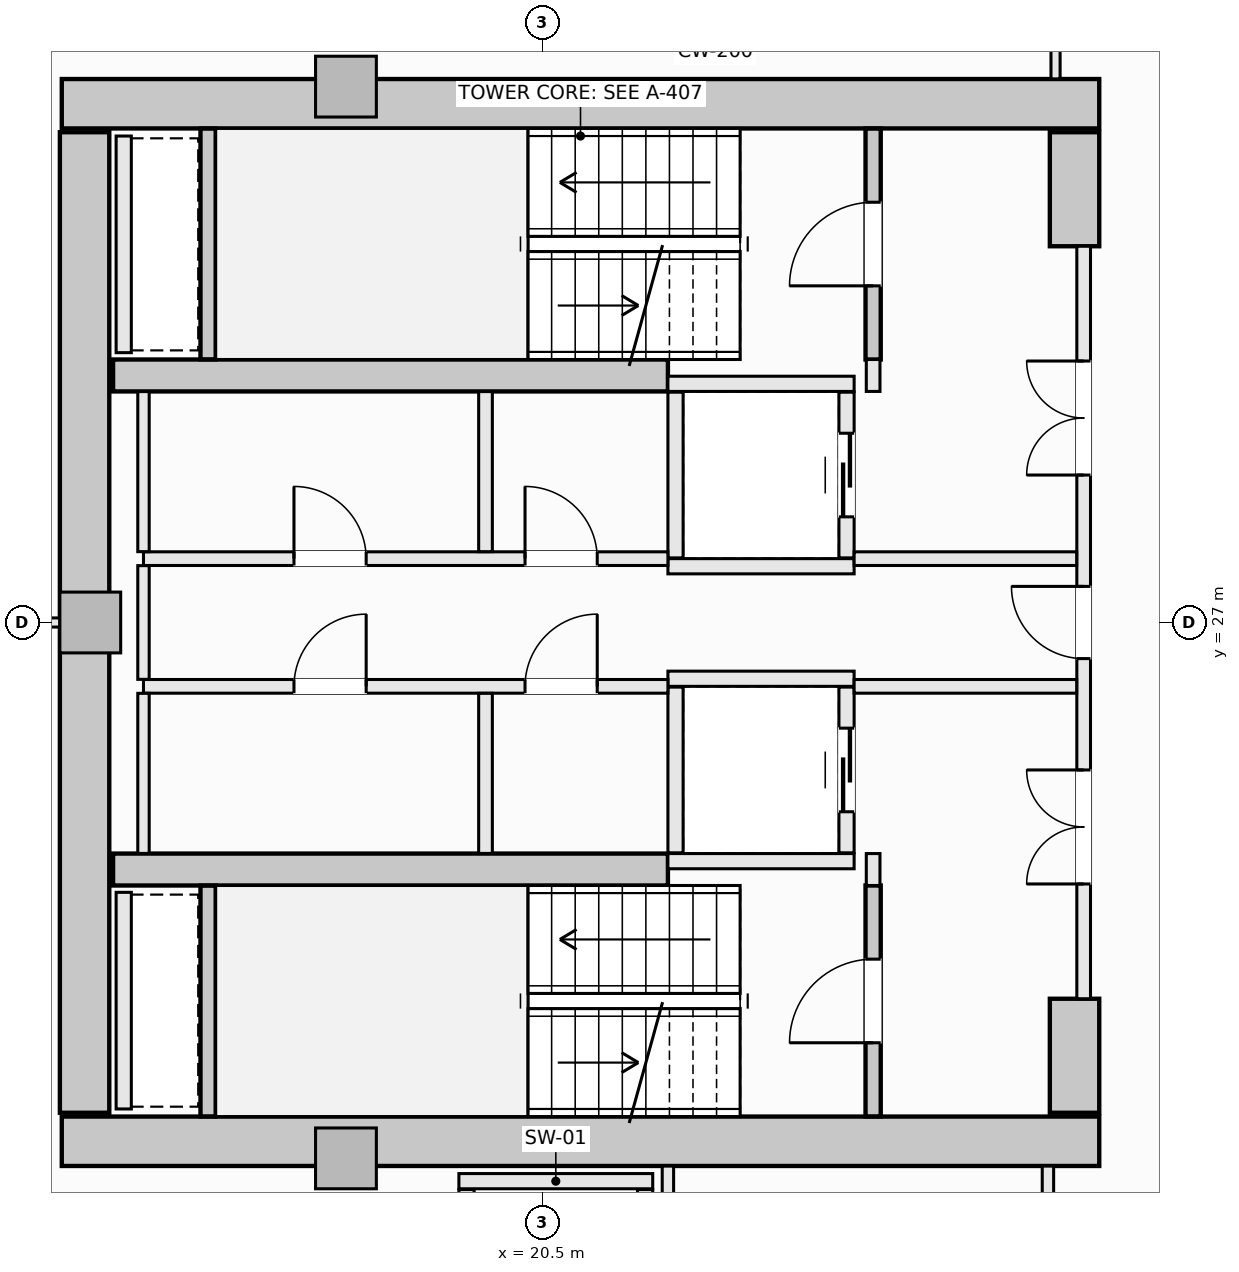
"""IFC4 building model, lengths in metres.
Left out: names, types, materials, properties, quantities, classifications, styles, units other than length and angle.
Written with IfcOpenShell. Run it as: python <this file> out.ifc"""

import sys

from ifc_helpers import new_model, si_unit, direction, frame, frame_2d, origin, origin_2d, place, context, subcontext, project, spatial, rectangle, extrude, element, fill, save


model = new_model("IFC4")
c1 = context("Model", 3, precision=1e-05, world=origin(), true_north=direction((0.0, 1.0)))
c2 = subcontext(c1, "Body", "Model", "MODEL_VIEW")
j1 = project(units=[si_unit("LENGTHUNIT", "METRE"), si_unit("PLANEANGLEUNIT", "RADIAN")], contexts=[c1])
p1 = place(None, origin())
s1 = spatial("IfcSite", under=j1, at=p1, CompositionType="ELEMENT")
p2 = place(p1, origin())
s2 = spatial("IfcBuilding", under=s1, at=p2, CompositionType="ELEMENT")
p3 = place(p2, frame((0.0, 0.0, 166.5)))
s3 = spatial("IfcBuildingStorey", under=s2, at=p3, CompositionType="ELEMENT", Elevation=166.5)
for number, where, z_axis, x_axis in (
    (1, (14.175, 33.825, -0.27), (0.0, 0.0, 1.0), (1.0, 0.0, 0.0)),
    (2, (14.175, 20.175, -0.27), (0.0, 0.0, 1.0), (1.0, 0.0, 0.0)),
):
    element("IfcWall", number, at=place(p3, frame(where, z_axis=z_axis, x_axis=x_axis)), inside=s3, PredefinedType="SHEAR", context=c2, shape_type="SweptSolid", body=[
        extrude(rectangle(XDim=13.65, YDim=0.65, at=frame_2d((6.825, 0.0))), origin(), (0.0, 0.0, 1.0), 3.4),
    ])
p4 = place(p3, frame((14.475, 20.55, -0.27), z_axis=(0.0, 0.0, 1.0), x_axis=(0.0, 1.0, 0.0)))
e3 = element("IfcWall", 3, at=p4, inside=s3, PredefinedType="SHEAR", context=c2, shape_type="SweptSolid", body=[
    extrude(rectangle(XDim=12.9, YDim=0.65, at=frame_2d((6.45, 0.0))), origin(), (0.0, 0.0, 1.0), 3.4),
])
for number, where, z_axis, x_axis in (
    (4, (27.5, 31.95, -0.27), (0.0, 0.0, 1.0), (0.0, 1.0, 0.0)),
    (5, (27.5, 20.55, -0.27), (0.0, 0.0, 1.0), (0.0, 1.0, 0.0)),
):
    element("IfcWall", number, at=place(p3, frame(where, z_axis=z_axis, x_axis=x_axis)), inside=s3, PredefinedType="SHEAR", context=c2, shape_type="SweptSolid", body=[
        extrude(rectangle(XDim=1.5, YDim=0.65, at=frame_2d((0.75, 0.0))), origin(), (0.0, 0.0, 1.0), 3.4),
    ])
for number, where, z_axis, x_axis in (
    (6, (14.85, 30.25, -0.27), (0.0, 0.0, 1.0), (1.0, 0.0, 0.0)),
    (7, (14.85, 23.75, -0.27), (0.0, 0.0, 1.0), (1.0, 0.0, 0.0)),
):
    element("IfcWall", number, at=place(p3, frame(where, z_axis=z_axis, x_axis=x_axis)), inside=s3, PredefinedType="SHEAR", context=c2, shape_type="SweptSolid", body=[
        extrude(rectangle(XDim=7.3, YDim=0.42, at=frame_2d((3.65, 0.0))), origin(), (0.0, 0.0, 1.0), 3.4),
    ])
for number, where, z_axis, x_axis in (
    (8, (17.914, 34.05, -0.27), (0.0, 0.0, 1.0), (1.0, 0.0, 0.0)),
    (9, (14.55, 27.0, -0.27), (0.0, 0.0, 1.0), (1.0, 0.0, 0.0)),
    (10, (17.914, 19.95, -0.27), (0.0, 0.0, 1.0), (1.0, 0.0, 0.0)),
):
    element("IfcColumn", number, at=place(p3, frame(where, z_axis=z_axis, x_axis=x_axis)), inside=s3, PredefinedType="PILASTER", context=c2, shape_type="SweptSolid", body=[
        extrude(rectangle(XDim=0.8, YDim=0.8, at=origin_2d()), origin(), (0.0, 0.0, 1.0), 3.4),
    ])
p5 = place(p3, frame((24.85, 30.46, -0.27), z_axis=(0.0, 0.0, 1.0), x_axis=(0.0, 1.0, 0.0)))
e11 = element("IfcWall", 11, at=p5, inside=s3, PredefinedType="SHEAR", context=c2, shape_type="SweptSolid", body=[
    extrude(rectangle(XDim=3.038, YDim=0.2, at=frame_2d((1.519, 0.0))), origin(), (0.0, 0.0, 1.0), 3.4),
])
p6 = place(p5, frame((0.969, 0.0, 0.27)))
e12 = element("IfcOpeningElement", 12, at=p6, cuts=e11, PredefinedType="OPENING", context=c2, shape_type="SweptSolid", body=[
    extrude(rectangle(XDim=1.1, YDim=2.15, at=frame_2d((0.55, 1.075))), frame((0.0, 0.11, 0.0), z_axis=(0.0, -1.0, 0.0), x_axis=(1.0, 0.0, 0.0)), (0.0, 0.0, 1.0), 0.22),
])
p7 = place(p3, frame((16.1, 30.462, -0.27), z_axis=(0.0, 0.0, 1.0), x_axis=(0.0, 1.0, 0.0)))
e13 = element("IfcWall", 13, at=p7, inside=s3, PredefinedType="SHEAR", context=c2, shape_type="SweptSolid", body=[
    extrude(rectangle(XDim=3.036, YDim=0.2, at=frame_2d((1.518, 0.0))), origin(), (0.0, 0.0, 1.0), 3.4),
])
p8 = place(p3, frame((24.85, 20.502, -0.27), z_axis=(0.0, 0.0, 1.0), x_axis=(0.0, 1.0, 0.0)))
e14 = element("IfcWall", 14, at=p8, inside=s3, PredefinedType="SHEAR", context=c2, shape_type="SweptSolid", body=[
    extrude(rectangle(XDim=3.038, YDim=0.2, at=frame_2d((1.519, 0.0))), origin(), (0.0, 0.0, 1.0), 3.4),
])
p9 = place(p8, frame((0.969, 0.0, 0.27)))
e15 = element("IfcOpeningElement", 15, at=p9, cuts=e14, PredefinedType="OPENING", context=c2, shape_type="SweptSolid", body=[
    extrude(rectangle(XDim=1.1, YDim=2.15, at=frame_2d((0.55, 1.075))), frame((0.0, 0.11, 0.0), z_axis=(0.0, -1.0, 0.0), x_axis=(1.0, 0.0, 0.0)), (0.0, 0.0, 1.0), 0.22),
])
p10 = place(p3, frame((16.1, 20.502, -0.27), z_axis=(0.0, 0.0, 1.0), x_axis=(0.0, 1.0, 0.0)))
e16 = element("IfcWall", 16, at=p10, inside=s3, PredefinedType="SHEAR", context=c2, shape_type="SweptSolid", body=[
    extrude(rectangle(XDim=3.036, YDim=0.2, at=frame_2d((1.518, 0.0))), origin(), (0.0, 0.0, 1.0), 3.4),
])
for number, where, z_axis, x_axis in (
    (17, (22.15, 30.14, 0.0), (0.0, 0.0, 1.0), (1.0, 0.0, 0.0)),
    (18, (22.15, 27.74, 0.0), (0.0, 0.0, 1.0), (1.0, 0.0, 0.0)),
):
    element("IfcWall", number, at=place(p3, frame(where, z_axis=z_axis, x_axis=x_axis)), inside=s3, PredefinedType="SOLIDWALL", context=c2, shape_type="SweptSolid", body=[
        extrude(rectangle(XDim=2.45, YDim=0.2, at=frame_2d((1.225, 0.0))), origin(), (0.0, 0.0, 1.0), 3.13),
    ])
p11 = place(p3, frame((22.25, 27.85, 0.0), z_axis=(0.0, 0.0, 1.0), x_axis=(0.0, 1.0, 0.0)))
e19 = element("IfcWall", 19, at=p11, inside=s3, PredefinedType="SOLIDWALL", context=c2, shape_type="SweptSolid", body=[
    extrude(rectangle(XDim=2.18, YDim=0.2, at=frame_2d((1.09, 0.0))), origin(), (0.0, 0.0, 1.0), 3.13),
])
p12 = place(p3, frame((24.5, 27.85, 0.0), z_axis=(0.0, 0.0, 1.0), x_axis=(0.0, 1.0, 0.0)))
e20 = element("IfcWall", 20, at=p12, inside=s3, PredefinedType="SOLIDWALL", context=c2, shape_type="SweptSolid", body=[
    extrude(rectangle(XDim=2.18, YDim=0.2, at=frame_2d((1.09, 0.0))), origin(), (0.0, 0.0, 1.0), 3.13),
])
p13 = place(p12, frame((0.54, 0.0, 0.0)))
e21 = element("IfcOpeningElement", 21, at=p13, cuts=e20, PredefinedType="OPENING", context=c2, shape_type="SweptSolid", body=[
    extrude(rectangle(XDim=1.1, YDim=2.2, at=frame_2d((0.55, 1.1))), frame((0.0, 0.11, 0.0), z_axis=(0.0, -1.0, 0.0), x_axis=(1.0, 0.0, 0.0)), (0.0, 0.0, 1.0), 0.22),
])
for number, where, z_axis, x_axis in (
    (22, (22.15, 26.26, 0.0), (0.0, 0.0, 1.0), (1.0, 0.0, 0.0)),
    (23, (22.15, 23.86, 0.0), (0.0, 0.0, 1.0), (1.0, 0.0, 0.0)),
):
    element("IfcWall", number, at=place(p3, frame(where, z_axis=z_axis, x_axis=x_axis)), inside=s3, PredefinedType="SOLIDWALL", context=c2, shape_type="SweptSolid", body=[
        extrude(rectangle(XDim=2.45, YDim=0.2, at=frame_2d((1.225, 0.0))), origin(), (0.0, 0.0, 1.0), 3.13),
    ])
p14 = place(p3, frame((22.25, 23.97, 0.0), z_axis=(0.0, 0.0, 1.0), x_axis=(0.0, 1.0, 0.0)))
e24 = element("IfcWall", 24, at=p14, inside=s3, PredefinedType="SOLIDWALL", context=c2, shape_type="SweptSolid", body=[
    extrude(rectangle(XDim=2.18, YDim=0.2, at=frame_2d((1.09, 0.0))), origin(), (0.0, 0.0, 1.0), 3.13),
])
p15 = place(p3, frame((24.5, 23.97, 0.0), z_axis=(0.0, 0.0, 1.0), x_axis=(0.0, 1.0, 0.0)))
e25 = element("IfcWall", 25, at=p15, inside=s3, PredefinedType="SOLIDWALL", context=c2, shape_type="SweptSolid", body=[
    extrude(rectangle(XDim=2.18, YDim=0.2, at=frame_2d((1.09, 0.0))), origin(), (0.0, 0.0, 1.0), 3.13),
])
p16 = place(p15, frame((0.54, 0.0, 0.0)))
e26 = element("IfcOpeningElement", 26, at=p16, cuts=e25, PredefinedType="OPENING", context=c2, shape_type="SweptSolid", body=[
    extrude(rectangle(XDim=1.1, YDim=2.2, at=frame_2d((0.55, 1.1))), frame((0.0, 0.11, 0.0), z_axis=(0.0, -1.0, 0.0), x_axis=(1.0, 0.0, 0.0)), (0.0, 0.0, 1.0), 0.22),
])
p17 = place(p3, frame((19.4, 19.65, 0.0), z_axis=(0.0, 0.0, 1.0), x_axis=(1.0, 0.0, 0.0)))
e27 = element("IfcWall", 27, at=p17, inside=s3, PredefinedType="SOLIDWALL", context=c2, shape_type="SweptSolid", body=[
    extrude(rectangle(XDim=2.55, YDim=0.2, at=frame_2d((1.275, 0.0))), origin(), (0.0, 0.0, 1.0), 3.13),
])
for number, where, z_axis, x_axis in (
    (28, (19.5, 17.01, 0.0), (0.0, 0.0, 1.0), (0.0, 1.0, 0.0)),
    (29, (21.85, 17.01, 0.0), (0.0, 0.0, 1.0), (0.0, 1.0, 0.0)),
):
    element("IfcWall", number, at=place(p3, frame(where, z_axis=z_axis, x_axis=x_axis)), inside=s3, PredefinedType="SOLIDWALL", context=c2, shape_type="SweptSolid", body=[
        extrude(rectangle(XDim=2.53, YDim=0.2, at=frame_2d((1.265, 0.0))), origin(), (0.0, 0.0, 1.0), 3.13),
    ])
for number, where, z_axis, x_axis in (
    (30, (14.99, 30.55, 0.0), (0.0, 0.0, 1.0), (0.0, 1.0, 0.0)),
    (31, (14.99, 20.6, 0.0), (0.0, 0.0, 1.0), (0.0, 1.0, 0.0)),
):
    element("IfcWall", number, at=place(p3, frame(where, z_axis=z_axis, x_axis=x_axis)), inside=s3, PredefinedType="SOLIDWALL", context=c2, shape_type="SweptSolid", body=[
        extrude(rectangle(XDim=2.85, YDim=0.2, at=frame_2d((1.425, 0.0))), origin(), (0.0, 0.0, 1.0), 3.13),
    ])
for number, where, z_axis, x_axis in (
    (32, (24.85, 23.54, 0.0), (0.0, 0.0, 1.0), (0.0, 1.0, 0.0)),
    (33, (24.85, 30.04, 0.0), (0.0, 0.0, 1.0), (0.0, 1.0, 0.0)),
):
    element("IfcWall", number, at=place(p3, frame(where, z_axis=z_axis, x_axis=x_axis)), inside=s3, PredefinedType="SOLIDWALL", context=c2, shape_type="SweptSolid", body=[
        extrude(rectangle(XDim=0.42, YDim=0.18, at=frame_2d((0.21, 0.0))), origin(), (0.0, 0.0, 1.0), 3.13),
    ])
p18 = place(p3, frame((27.62, 22.05, 0.0), z_axis=(0.0, 0.0, 1.0), x_axis=(0.0, 1.0, 0.0)))
e34 = element("IfcWall", 34, at=p18, inside=s3, PredefinedType="SOLIDWALL", context=c2, shape_type="SweptSolid", body=[
    extrude(rectangle(XDim=9.9, YDim=0.18, at=frame_2d((4.95, 0.0))), origin(), (0.0, 0.0, 1.0), 3.13),
])
p19 = place(p18, frame((4.475, 0.0, 0.0)))
e35 = element("IfcOpeningElement", 35, at=p19, cuts=e34, PredefinedType="OPENING", context=c2, shape_type="SweptSolid", body=[
    extrude(rectangle(XDim=0.95, YDim=2.1, at=frame_2d((0.475, 1.05))), frame((0.0, 0.1, 0.0), z_axis=(0.0, -1.0, 0.0), x_axis=(1.0, 0.0, 0.0)), (0.0, 0.0, 1.0), 0.2),
])
p20 = place(p18, frame((6.89, 0.0, 0.0)))
e36 = element("IfcOpeningElement", 36, at=p20, cuts=e34, PredefinedType="OPENING", context=c2, shape_type="SweptSolid", body=[
    extrude(rectangle(XDim=1.5, YDim=2.2, at=frame_2d((0.75, 1.1))), frame((0.0, 0.1, 0.0), z_axis=(0.0, -1.0, 0.0), x_axis=(1.0, 0.0, 0.0)), (0.0, 0.0, 1.0), 0.2),
])
p21 = place(p18, frame((1.51, 0.0, 0.0)))
e37 = element("IfcOpeningElement", 37, at=p21, cuts=e34, PredefinedType="OPENING", context=c2, shape_type="SweptSolid", body=[
    extrude(rectangle(XDim=1.5, YDim=2.2, at=frame_2d((0.75, 1.1))), frame((0.0, 0.1, 0.0), z_axis=(0.0, -1.0, 0.0), x_axis=(1.0, 0.0, 0.0)), (0.0, 0.0, 1.0), 0.2),
])
p22 = place(p3, frame((15.25, 27.84, 0.0), z_axis=(0.0, 0.0, 1.0), x_axis=(1.0, 0.0, 0.0)))
e38 = element("IfcWall", 38, at=p22, inside=s3, PredefinedType="SOLIDWALL", context=c2, shape_type="SweptSolid", body=[
    extrude(rectangle(XDim=6.9, YDim=0.18, at=frame_2d((3.45, 0.0))), origin(), (0.0, 0.0, 1.0), 3.13),
])
p23 = place(p22, frame((5.02, 0.0, 0.0)))
e39 = element("IfcOpeningElement", 39, at=p23, cuts=e38, PredefinedType="OPENING", context=c2, shape_type="SweptSolid", body=[
    extrude(rectangle(XDim=0.95, YDim=2.1, at=frame_2d((0.475, 1.05))), frame((0.0, 0.1, 0.0), z_axis=(0.0, -1.0, 0.0), x_axis=(1.0, 0.0, 0.0)), (0.0, 0.0, 1.0), 0.2),
])
p24 = place(p22, frame((1.98, 0.0, 0.0)))
e40 = element("IfcOpeningElement", 40, at=p24, cuts=e38, PredefinedType="OPENING", context=c2, shape_type="SweptSolid", body=[
    extrude(rectangle(XDim=0.95, YDim=2.1, at=frame_2d((0.475, 1.05))), frame((0.0, 0.1, 0.0), z_axis=(0.0, -1.0, 0.0), x_axis=(1.0, 0.0, 0.0)), (0.0, 0.0, 1.0), 0.2),
])
p25 = place(p3, frame((24.6, 27.84, 0.0), z_axis=(0.0, 0.0, 1.0), x_axis=(1.0, 0.0, 0.0)))
e41 = element("IfcWall", 41, at=p25, inside=s3, PredefinedType="SOLIDWALL", context=c2, shape_type="SweptSolid", body=[
    extrude(rectangle(XDim=2.928, YDim=0.18, at=frame_2d((1.464, 0.0))), origin(), (0.0, 0.0, 1.0), 3.13),
])
p26 = place(p3, frame((15.25, 26.16, 0.0), z_axis=(0.0, 0.0, 1.0), x_axis=(1.0, 0.0, 0.0)))
e42 = element("IfcWall", 42, at=p26, inside=s3, PredefinedType="SOLIDWALL", context=c2, shape_type="SweptSolid", body=[
    extrude(rectangle(XDim=6.9, YDim=0.18, at=frame_2d((3.45, 0.0))), origin(), (0.0, 0.0, 1.0), 3.13),
])
p27 = place(p26, frame((5.02, 0.0, 0.0)))
e43 = element("IfcOpeningElement", 43, at=p27, cuts=e42, PredefinedType="OPENING", context=c2, shape_type="SweptSolid", body=[
    extrude(rectangle(XDim=0.95, YDim=2.1, at=frame_2d((0.475, 1.05))), frame((0.0, 0.1, 0.0), z_axis=(0.0, -1.0, 0.0), x_axis=(1.0, 0.0, 0.0)), (0.0, 0.0, 1.0), 0.2),
])
p28 = place(p26, frame((1.98, 0.0, 0.0)))
e44 = element("IfcOpeningElement", 44, at=p28, cuts=e42, PredefinedType="OPENING", context=c2, shape_type="SweptSolid", body=[
    extrude(rectangle(XDim=0.95, YDim=2.1, at=frame_2d((0.475, 1.05))), frame((0.0, 0.1, 0.0), z_axis=(0.0, -1.0, 0.0), x_axis=(1.0, 0.0, 0.0)), (0.0, 0.0, 1.0), 0.2),
])
p29 = place(p3, frame((24.6, 26.16, 0.0), z_axis=(0.0, 0.0, 1.0), x_axis=(1.0, 0.0, 0.0)))
e45 = element("IfcWall", 45, at=p29, inside=s3, PredefinedType="SOLIDWALL", context=c2, shape_type="SweptSolid", body=[
    extrude(rectangle(XDim=2.928, YDim=0.18, at=frame_2d((1.464, 0.0))), origin(), (0.0, 0.0, 1.0), 3.13),
])
p30 = place(p3, frame((15.25, 23.962, 0.0), z_axis=(0.0, 0.0, 1.0), x_axis=(0.0, 1.0, 0.0)))
e46 = element("IfcWall", 46, at=p30, inside=s3, PredefinedType="PARTITIONING", context=c2, shape_type="SweptSolid", body=[
    extrude(rectangle(XDim=2.106, YDim=0.15, at=frame_2d((1.053, 0.0))), origin(), (0.0, 0.0, 1.0), 3.13),
])
p31 = place(p3, frame((15.25, 26.252, 0.0), z_axis=(0.0, 0.0, 1.0), x_axis=(0.0, 1.0, 0.0)))
e47 = element("IfcWall", 47, at=p31, inside=s3, PredefinedType="PARTITIONING", context=c2, shape_type="SweptSolid", body=[
    extrude(rectangle(XDim=1.496, YDim=0.15, at=frame_2d((0.748, 0.0))), origin(), (0.0, 0.0, 1.0), 3.13),
])
p32 = place(p3, frame((15.25, 27.932, 0.0), z_axis=(0.0, 0.0, 1.0), x_axis=(0.0, 1.0, 0.0)))
e48 = element("IfcWall", 48, at=p32, inside=s3, PredefinedType="PARTITIONING", context=c2, shape_type="SweptSolid", body=[
    extrude(rectangle(XDim=2.106, YDim=0.15, at=frame_2d((1.053, 0.0))), origin(), (0.0, 0.0, 1.0), 3.13),
])
for number, where, z_axis, x_axis in (
    (49, (19.75, 23.962, 0.0), (0.0, 0.0, 1.0), (0.0, 1.0, 0.0)),
    (50, (19.75, 27.932, 0.0), (0.0, 0.0, 1.0), (0.0, 1.0, 0.0)),
):
    element("IfcWall", number, at=place(p3, frame(where, z_axis=z_axis, x_axis=x_axis)), inside=s3, PredefinedType="SOLIDWALL", context=c2, shape_type="SweptSolid", body=[
        extrude(rectangle(XDim=2.106, YDim=0.18, at=frame_2d((1.053, 0.0))), origin(), (0.0, 0.0, 1.0), 3.13),
    ])
p33 = place(p3, frame((22.15, 17.127, 0.0), z_axis=(0.0, 0.0, 1.0), x_axis=(0.0, 1.0, 0.0)))
e51 = element("IfcWall", 51, at=p33, inside=s3, PredefinedType="PARTITIONING", context=c2, shape_type="SweptSolid", body=[
    extrude(rectangle(XDim=2.721, YDim=0.15, at=frame_2d((1.36, 0.0))), origin(), (0.0, 0.0, 1.0), 3.13),
])
p34 = place(p3, frame((27.15, 17.127, 0.0), z_axis=(0.0, 0.0, 1.0), x_axis=(0.0, 1.0, 0.0)))
e52 = element("IfcWall", 52, at=p34, inside=s3, PredefinedType="PARTITIONING", context=c2, shape_type="SweptSolid", body=[
    extrude(rectangle(XDim=2.721, YDim=0.15, at=frame_2d((1.36, 0.0))), origin(), (0.0, 0.0, 1.0), 3.13),
])
p35 = place(p34, frame((0.885, 0.0, 0.0)))
e53 = element("IfcOpeningElement", 53, at=p35, cuts=e52, PredefinedType="OPENING", context=c2, shape_type="SweptSolid", body=[
    extrude(rectangle(XDim=0.95, YDim=2.1, at=frame_2d((0.475, 1.05))), frame((0.0, 0.085, 0.0), z_axis=(0.0, -1.0, 0.0), x_axis=(1.0, 0.0, 0.0)), (0.0, 0.0, 1.0), 0.17),
])
p36 = place(p3, frame((27.25, 34.152, 0.0), z_axis=(0.0, 0.0, 1.0), x_axis=(0.0, 1.0, 0.0)))
e54 = element("IfcWall", 54, at=p36, inside=s3, PredefinedType="PARTITIONING", context=c2, shape_type="SweptSolid", body=[
    extrude(rectangle(XDim=0.806, YDim=0.12, at=frame_2d((0.403, 0.0))), origin(), (0.0, 0.0, 1.0), 3.13),
])
p37 = place(p3, frame((8.342, 27.0, 0.0), z_axis=(0.0, 0.0, 1.0), x_axis=(1.0, 0.0, 0.0)))
e55 = element("IfcWall", 55, at=p37, inside=s3, PredefinedType="PARTITIONING", context=c2, shape_type="SweptSolid", body=[
    extrude(rectangle(XDim=5.806, YDim=0.12, at=frame_2d((2.903, 0.0))), origin(), (0.0, 0.0, 1.0), 2.505),
])
p38 = place(p6, origin())
e56 = element("IfcDoor", 56, at=p38, inside=s3, OperationType="SINGLE_SWING_LEFT", PredefinedType="DOOR", context=c2, shape_type="SweptSolid", body=[
    extrude(rectangle(XDim=1.1, YDim=2.15, at=frame_2d((0.55, 1.075))), frame((0.0, 0.025, 0.0), z_axis=(0.0, -1.0, 0.0), x_axis=(1.0, 0.0, 0.0)), (0.0, 0.0, 1.0), 0.05),
])
fill(e12, e56)
p39 = place(p9, origin())
e57 = element("IfcDoor", 57, at=p39, inside=s3, OperationType="SINGLE_SWING_LEFT", PredefinedType="DOOR", context=c2, shape_type="SweptSolid", body=[
    extrude(rectangle(XDim=1.1, YDim=2.15, at=frame_2d((0.55, 1.075))), frame((0.0, 0.025, 0.0), z_axis=(0.0, -1.0, 0.0), x_axis=(1.0, 0.0, 0.0)), (0.0, 0.0, 1.0), 0.05),
])
fill(e15, e57)
p40 = place(p13, origin())
e58 = element("IfcDoor", 58, at=p40, inside=s3, OperationType="SLIDING_TO_LEFT", PredefinedType="DOOR", context=c2, shape_type="SweptSolid", body=[
    extrude(rectangle(XDim=1.1, YDim=2.2, at=frame_2d((0.55, 1.1))), frame((0.0, 0.025, 0.0), z_axis=(0.0, -1.0, 0.0), x_axis=(1.0, 0.0, 0.0)), (0.0, 0.0, 1.0), 0.05),
])
fill(e21, e58)
p41 = place(p16, origin())
e59 = element("IfcDoor", 59, at=p41, inside=s3, OperationType="SLIDING_TO_LEFT", PredefinedType="DOOR", context=c2, shape_type="SweptSolid", body=[
    extrude(rectangle(XDim=1.1, YDim=2.2, at=frame_2d((0.55, 1.1))), frame((0.0, 0.025, 0.0), z_axis=(0.0, -1.0, 0.0), x_axis=(1.0, 0.0, 0.0)), (0.0, 0.0, 1.0), 0.05),
])
fill(e26, e59)
p42 = place(p19, origin())
e60 = element("IfcDoor", 60, at=p42, inside=s3, OperationType="SINGLE_SWING_RIGHT", PredefinedType="DOOR", context=c2, shape_type="SweptSolid", body=[
    extrude(rectangle(XDim=0.95, YDim=2.1, at=frame_2d((0.475, 1.05))), frame((0.0, 0.025, 0.0), z_axis=(0.0, -1.0, 0.0), x_axis=(1.0, 0.0, 0.0)), (0.0, 0.0, 1.0), 0.05),
])
fill(e35, e60)
p43 = place(p20, origin())
e61 = element("IfcDoor", 61, at=p43, inside=s3, OperationType="DOUBLE_DOOR_SINGLE_SWING", PredefinedType="DOOR", context=c2, shape_type="SweptSolid", body=[
    extrude(rectangle(XDim=1.5, YDim=2.2, at=frame_2d((0.75, 1.1))), frame((0.0, 0.025, 0.0), z_axis=(0.0, -1.0, 0.0), x_axis=(1.0, 0.0, 0.0)), (0.0, 0.0, 1.0), 0.05),
])
fill(e36, e61)
p44 = place(p21, origin())
e62 = element("IfcDoor", 62, at=p44, inside=s3, OperationType="DOUBLE_DOOR_SINGLE_SWING", PredefinedType="DOOR", context=c2, shape_type="SweptSolid", body=[
    extrude(rectangle(XDim=1.5, YDim=2.2, at=frame_2d((0.75, 1.1))), frame((0.0, 0.025, 0.0), z_axis=(0.0, -1.0, 0.0), x_axis=(1.0, 0.0, 0.0)), (0.0, 0.0, 1.0), 0.05),
])
fill(e37, e62)
p45 = place(p23, origin())
e63 = element("IfcDoor", 63, at=p45, inside=s3, OperationType="SINGLE_SWING_LEFT", PredefinedType="DOOR", context=c2, shape_type="SweptSolid", body=[
    extrude(rectangle(XDim=0.95, YDim=2.1, at=frame_2d((0.475, 1.05))), frame((0.0, 0.025, 0.0), z_axis=(0.0, -1.0, 0.0), x_axis=(1.0, 0.0, 0.0)), (0.0, 0.0, 1.0), 0.05),
])
fill(e39, e63)
p46 = place(p27, origin())
e64 = element("IfcDoor", 64, at=p46, inside=s3, OperationType="SINGLE_SWING_RIGHT", PredefinedType="DOOR", context=c2, shape_type="SweptSolid", body=[
    extrude(rectangle(XDim=0.95, YDim=2.1, at=frame_2d((0.475, 1.05))), frame((0.0, 0.025, 0.0), z_axis=(0.0, -1.0, 0.0), x_axis=(1.0, 0.0, 0.0)), (0.0, 0.0, 1.0), 0.05),
])
fill(e43, e64)
p47 = place(p24, origin())
e65 = element("IfcDoor", 65, at=p47, inside=s3, OperationType="SINGLE_SWING_LEFT", PredefinedType="DOOR", context=c2, shape_type="SweptSolid", body=[
    extrude(rectangle(XDim=0.95, YDim=2.1, at=frame_2d((0.475, 1.05))), frame((0.0, 0.025, 0.0), z_axis=(0.0, -1.0, 0.0), x_axis=(1.0, 0.0, 0.0)), (0.0, 0.0, 1.0), 0.05),
])
fill(e40, e65)
p48 = place(p28, origin())
e66 = element("IfcDoor", 66, at=p48, inside=s3, OperationType="SINGLE_SWING_RIGHT", PredefinedType="DOOR", context=c2, shape_type="SweptSolid", body=[
    extrude(rectangle(XDim=0.95, YDim=2.1, at=frame_2d((0.475, 1.05))), frame((0.0, 0.025, 0.0), z_axis=(0.0, -1.0, 0.0), x_axis=(1.0, 0.0, 0.0)), (0.0, 0.0, 1.0), 0.05),
])
fill(e44, e66)
save(model, sys.argv[1])
